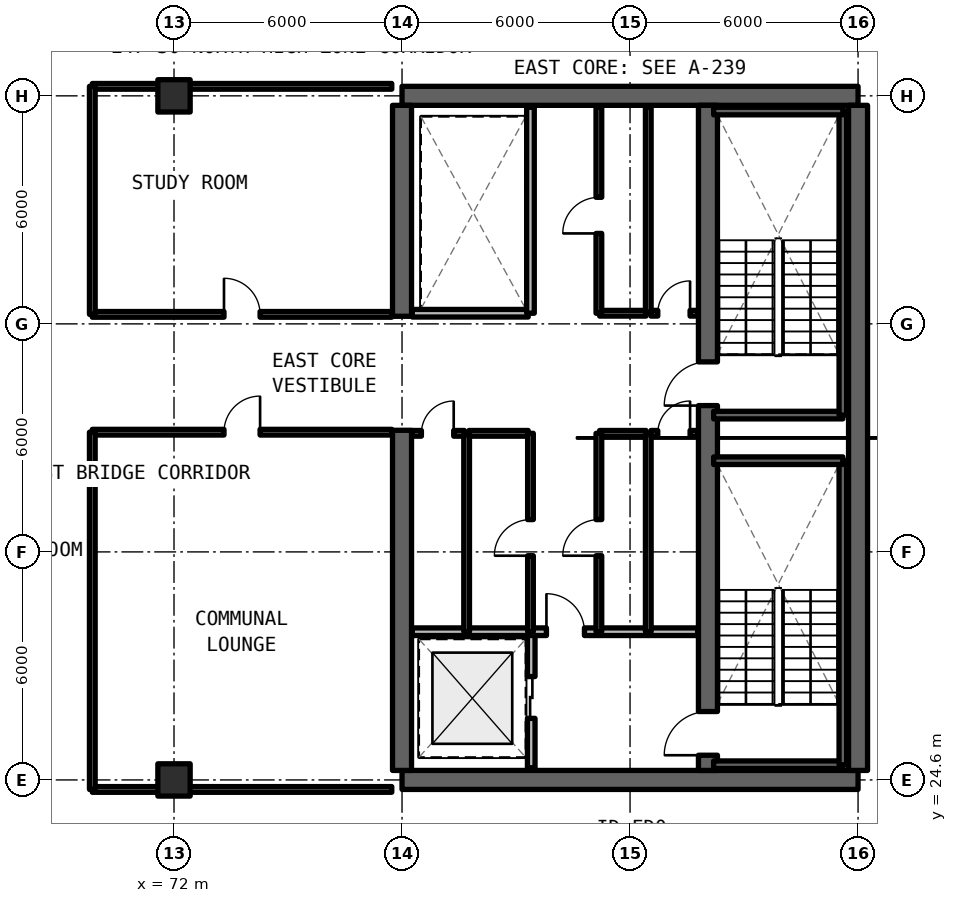
"""IFC4 building model, lengths in metres.
Left out: names, types, materials, properties, quantities, classifications, styles, units other than length and angle.
Written with IfcOpenShell. Run it as: python <this file> out.ifc"""

import sys

from ifc_helpers import new_model, si_unit, direction, frame, frame_2d, origin, origin_2d, place, context, subcontext, project, spatial, rectangle, extrude, element, fill, save


model = new_model("IFC4")
c1 = context("Model", 3, precision=1e-05, world=origin(), true_north=direction((0.0, 1.0)))
c2 = subcontext(c1, "Body", "Model", "MODEL_VIEW")
j1 = project(units=[si_unit("LENGTHUNIT", "METRE"), si_unit("PLANEANGLEUNIT", "RADIAN")], contexts=[c1])
p1 = place(None, origin())
s1 = spatial("IfcSite", under=j1, at=p1, CompositionType="ELEMENT")
p2 = place(p1, origin())
s2 = spatial("IfcBuilding", under=s1, at=p2, CompositionType="ELEMENT")
p3 = place(p2, frame((0.0, 0.0, 169.29)))
s3 = spatial("IfcBuildingStorey", under=s2, at=p3, CompositionType="ELEMENT", Elevation=169.29)
for number, where, z_axis, x_axis in (
    (1, (78.0, 24.6, 0.0), (0.0, 0.0, 1.0), (1.0, 0.0, 0.0)),
    (2, (90.0, 42.6, 0.0), (0.0, 0.0, 1.0), (-1.0, 0.0, 0.0)),
):
    element("IfcWall", number, at=place(p3, frame(where, z_axis=z_axis, x_axis=x_axis)), inside=s3, PredefinedType="SHEAR", context=c2, shape_type="SweptSolid", body=[
        extrude(rectangle(XDim=12.0, YDim=0.5, at=frame_2d((6.0, 0.0))), origin(), (0.0, 0.0, 1.0), 3.63),
    ])
p4 = place(p3, frame((90.0, 24.85, 0.0), z_axis=(0.0, 0.0, 1.0), x_axis=(0.0, 1.0, 0.0)))
e3 = element("IfcWall", 3, at=p4, inside=s3, PredefinedType="SHEAR", context=c2, shape_type="SweptSolid", body=[
    extrude(rectangle(XDim=17.5, YDim=0.5, at=frame_2d((8.75, 0.0))), origin(), (0.0, 0.0, 1.0), 3.63),
])
p5 = place(p3, frame((78.0, 24.85, 0.0), z_axis=(0.0, 0.0, 1.0), x_axis=(0.0, 1.0, 0.0)))
e4 = element("IfcWall", 4, at=p5, inside=s3, PredefinedType="SHEAR", context=c2, shape_type="SweptSolid", body=[
    extrude(rectangle(XDim=8.95, YDim=0.5, at=frame_2d((4.475, 0.0))), origin(), (0.0, 0.0, 1.0), 3.63),
])
p6 = place(p3, frame((78.0, 36.8, 0.0), z_axis=(0.0, 0.0, 1.0), x_axis=(0.0, 1.0, 0.0)))
e5 = element("IfcWall", 5, at=p6, inside=s3, PredefinedType="SHEAR", context=c2, shape_type="SweptSolid", body=[
    extrude(rectangle(XDim=5.55, YDim=0.5, at=frame_2d((2.775, 0.0))), origin(), (0.0, 0.0, 1.0), 3.63),
])
p7 = place(p3, frame((86.05, 24.85, 0.0), z_axis=(0.0, 0.0, 1.0), x_axis=(0.0, 1.0, 0.0)))
e6 = element("IfcWall", 6, at=p7, inside=s3, PredefinedType="SHEAR", context=c2, shape_type="SweptSolid", body=[
    extrude(rectangle(XDim=17.5, YDim=0.5, at=frame_2d((8.75, 0.0))), origin(), (0.0, 0.0, 1.0), 3.63),
])
p8 = place(p7, frame((0.4, 0.0, 0.0)))
e7 = element("IfcOpeningElement", 7, at=p8, cuts=e6, PredefinedType="OPENING", context=c2, shape_type="SweptSolid", body=[
    extrude(rectangle(XDim=1.15, YDim=2.15, at=frame_2d((0.575, 1.075))), frame((0.0, 0.26, 0.0), z_axis=(0.0, -1.0, 0.0), x_axis=(1.0, 0.0, 0.0)), (0.0, 0.0, 1.0), 0.52),
])
p9 = place(p7, frame((9.6, 0.0, 0.0)))
e8 = element("IfcOpeningElement", 8, at=p9, cuts=e6, PredefinedType="OPENING", context=c2, shape_type="SweptSolid", body=[
    extrude(rectangle(XDim=1.15, YDim=2.15, at=frame_2d((0.575, 1.075))), frame((0.0, 0.26, 0.0), z_axis=(0.0, -1.0, 0.0), x_axis=(1.0, 0.0, 0.0)), (0.0, 0.0, 1.0), 0.52),
])
for number, where, z_axis, x_axis in (
    (9, (72.0, 24.6, 0.0), (0.0, 0.0, 1.0), (1.0, 0.0, 0.0)),
    (10, (72.0, 42.6, 0.0), (0.0, 0.0, 1.0), (1.0, 0.0, 0.0)),
):
    element("IfcColumn", number, at=place(p3, frame(where, z_axis=z_axis, x_axis=x_axis)), inside=s3, PredefinedType="COLUMN", context=c2, shape_type="SweptSolid", body=[
        extrude(rectangle(XDim=0.85, YDim=0.85, at=origin_2d()), origin(), (0.0, 0.0, 1.0), 3.63),
    ])
p10 = place(p3, frame((81.4, 24.92, 0.0), z_axis=(0.0, 0.0, 1.0), x_axis=(0.0, 1.0, 0.0)))
e11 = element("IfcWall", 11, at=p10, inside=s3, PredefinedType="SOLIDWALL", context=c2, shape_type="SweptSolid", body=[
    extrude(rectangle(XDim=3.58, YDim=0.2, at=frame_2d((1.79, 0.0))), origin(), (0.0, 0.0, 1.0), 2.57),
])
p11 = place(p10, frame((1.3, 0.0, 0.0)))
e12 = element("IfcOpeningElement", 12, at=p11, cuts=e11, PredefinedType="OPENING", context=c2, shape_type="SweptSolid", body=[
    extrude(rectangle(XDim=1.1, YDim=2.2, at=frame_2d((0.55, 1.1))), frame((0.0, 0.11, 0.0), z_axis=(0.0, -1.0, 0.0), x_axis=(1.0, 0.0, 0.0)), (0.0, 0.0, 1.0), 0.22),
])
p12 = place(p3, frame((78.27, 28.5, 0.0), z_axis=(0.0, 0.0, 1.0), x_axis=(1.0, 0.0, 0.0)))
e13 = element("IfcWall", 13, at=p12, inside=s3, PredefinedType="SOLIDWALL", context=c2, shape_type="SweptSolid", body=[
    extrude(rectangle(XDim=7.51, YDim=0.2, at=frame_2d((3.755, 0.0))), origin(), (0.0, 0.0, 1.0), 2.57),
])
p13 = place(p12, frame((3.53, 0.0, 0.0)))
e14 = element("IfcOpeningElement", 14, at=p13, cuts=e13, PredefinedType="OPENING", context=c2, shape_type="SweptSolid", body=[
    extrude(rectangle(XDim=1.0, YDim=2.15, at=frame_2d((0.5, 1.075))), frame((0.0, 0.11, 0.0), z_axis=(0.0, -1.0, 0.0), x_axis=(1.0, 0.0, 0.0)), (0.0, 0.0, 1.0), 0.22),
])
p14 = place(p3, frame((84.48, 28.5, 0.0), z_axis=(0.0, 0.0, 1.0), x_axis=(0.0, 1.0, 0.0)))
e15 = element("IfcWall", 15, at=p14, inside=s3, PredefinedType="SOLIDWALL", context=c2, shape_type="SweptSolid", body=[
    extrude(rectangle(XDim=5.22, YDim=0.15, at=frame_2d((2.61, 0.0))), origin(), (0.0, 0.0, 1.0), 2.57),
])
p15 = place(p3, frame((84.55, 33.72, 0.0), z_axis=(0.0, 0.0, 1.0), x_axis=(1.0, 0.0, 0.0)))
e16 = element("IfcWall", 16, at=p15, inside=s3, PredefinedType="SOLIDWALL", context=c2, shape_type="SweptSolid", body=[
    extrude(rectangle(XDim=1.23, YDim=0.15, at=frame_2d((0.615, 0.0))), origin(), (0.0, 0.0, 1.0), 2.57),
])
p16 = place(p15, frame((0.18, 0.0, 0.0)))
e17 = element("IfcOpeningElement", 17, at=p16, cuts=e16, PredefinedType="OPENING", context=c2, shape_type="SweptSolid", body=[
    extrude(rectangle(XDim=0.85, YDim=2.1, at=frame_2d((0.425, 1.05))), frame((0.0, 0.085, 0.0), z_axis=(0.0, -1.0, 0.0), x_axis=(1.0, 0.0, 0.0)), (0.0, 0.0, 1.0), 0.17),
])
p17 = place(p3, frame((83.2, 33.72, 0.0), z_axis=(0.0, 0.0, 1.0), x_axis=(1.0, 0.0, 0.0)))
e18 = element("IfcWall", 18, at=p17, inside=s3, PredefinedType="SOLIDWALL", context=c2, shape_type="SweptSolid", body=[
    extrude(rectangle(XDim=1.22, YDim=0.15, at=frame_2d((0.61, 0.0))), origin(), (0.0, 0.0, 1.0), 2.57),
])
p18 = place(p3, frame((83.18, 28.5, 0.0), z_axis=(0.0, 0.0, 1.0), x_axis=(0.0, 1.0, 0.0)))
e19 = element("IfcWall", 19, at=p18, inside=s3, PredefinedType="SOLIDWALL", context=c2, shape_type="SweptSolid", body=[
    extrude(rectangle(XDim=5.22, YDim=0.15, at=frame_2d((2.61, 0.0))), origin(), (0.0, 0.0, 1.0), 2.57),
])
p19 = place(p18, frame((2.0, 0.0, 0.0)))
e20 = element("IfcOpeningElement", 20, at=p19, cuts=e19, PredefinedType="OPENING", context=c2, shape_type="SweptSolid", body=[
    extrude(rectangle(XDim=0.95, YDim=2.15, at=frame_2d((0.475, 1.075))), frame((0.0, 0.085, 0.0), z_axis=(0.0, -1.0, 0.0), x_axis=(1.0, 0.0, 0.0)), (0.0, 0.0, 1.0), 0.17),
])
p20 = place(p3, frame((79.7, 28.5, 0.0), z_axis=(0.0, 0.0, 1.0), x_axis=(0.0, 1.0, 0.0)))
e21 = element("IfcWall", 21, at=p20, inside=s3, PredefinedType="SOLIDWALL", context=c2, shape_type="SweptSolid", body=[
    extrude(rectangle(XDim=5.22, YDim=0.15, at=frame_2d((2.61, 0.0))), origin(), (0.0, 0.0, 1.0), 2.57),
])
p21 = place(p3, frame((79.76, 33.72, 0.0), z_axis=(0.0, 0.0, 1.0), x_axis=(1.0, 0.0, 0.0)))
e22 = element("IfcWall", 22, at=p21, inside=s3, PredefinedType="SOLIDWALL", context=c2, shape_type="SweptSolid", body=[
    extrude(rectangle(XDim=1.56, YDim=0.15, at=frame_2d((0.78, 0.0))), origin(), (0.0, 0.0, 1.0), 2.57),
])
p22 = place(p3, frame((78.27, 33.72, 0.0), z_axis=(0.0, 0.0, 1.0), x_axis=(1.0, 0.0, 0.0)))
e23 = element("IfcWall", 23, at=p22, inside=s3, PredefinedType="SOLIDWALL", context=c2, shape_type="SweptSolid", body=[
    extrude(rectangle(XDim=1.37, YDim=0.15, at=frame_2d((0.685, 0.0))), origin(), (0.0, 0.0, 1.0), 2.57),
])
p23 = place(p22, frame((0.24, 0.0, 0.0)))
e24 = element("IfcOpeningElement", 24, at=p23, cuts=e23, PredefinedType="OPENING", context=c2, shape_type="SweptSolid", body=[
    extrude(rectangle(XDim=0.85, YDim=2.1, at=frame_2d((0.425, 1.05))), frame((0.0, 0.085, 0.0), z_axis=(0.0, -1.0, 0.0), x_axis=(1.0, 0.0, 0.0)), (0.0, 0.0, 1.0), 0.17),
])
p24 = place(p3, frame((81.38, 28.5, 0.0), z_axis=(0.0, 0.0, 1.0), x_axis=(0.0, 1.0, 0.0)))
e25 = element("IfcWall", 25, at=p24, inside=s3, PredefinedType="SOLIDWALL", context=c2, shape_type="SweptSolid", body=[
    extrude(rectangle(XDim=5.22, YDim=0.15, at=frame_2d((2.61, 0.0))), origin(), (0.0, 0.0, 1.0), 2.57),
])
p25 = place(p24, frame((2.0, 0.0, 0.0)))
e26 = element("IfcOpeningElement", 26, at=p25, cuts=e25, PredefinedType="OPENING", context=c2, shape_type="SweptSolid", body=[
    extrude(rectangle(XDim=0.95, YDim=2.15, at=frame_2d((0.475, 1.075))), frame((0.0, 0.085, 0.0), z_axis=(0.0, -1.0, 0.0), x_axis=(1.0, 0.0, 0.0)), (0.0, 0.0, 1.0), 0.17),
])
p26 = place(p3, frame((84.48, 36.88, 0.0), z_axis=(0.0, 0.0, 1.0), x_axis=(0.0, 1.0, 0.0)))
e27 = element("IfcWall", 27, at=p26, inside=s3, PredefinedType="SOLIDWALL", context=c2, shape_type="SweptSolid", body=[
    extrude(rectangle(XDim=5.42, YDim=0.15, at=frame_2d((2.71, 0.0))), origin(), (0.0, 0.0, 1.0), 2.57),
])
p27 = place(p3, frame((84.55, 36.88, 0.0), z_axis=(0.0, 0.0, 1.0), x_axis=(1.0, 0.0, 0.0)))
e28 = element("IfcWall", 28, at=p27, inside=s3, PredefinedType="SOLIDWALL", context=c2, shape_type="SweptSolid", body=[
    extrude(rectangle(XDim=1.23, YDim=0.15, at=frame_2d((0.615, 0.0))), origin(), (0.0, 0.0, 1.0), 2.57),
])
p28 = place(p27, frame((0.18, 0.0, 0.0)))
e29 = element("IfcOpeningElement", 29, at=p28, cuts=e28, PredefinedType="OPENING", context=c2, shape_type="SweptSolid", body=[
    extrude(rectangle(XDim=0.85, YDim=2.1, at=frame_2d((0.425, 1.05))), frame((0.0, 0.085, 0.0), z_axis=(0.0, -1.0, 0.0), x_axis=(1.0, 0.0, 0.0)), (0.0, 0.0, 1.0), 0.17),
])
p29 = place(p3, frame((83.2, 36.88, 0.0), z_axis=(0.0, 0.0, 1.0), x_axis=(1.0, 0.0, 0.0)))
e30 = element("IfcWall", 30, at=p29, inside=s3, PredefinedType="SOLIDWALL", context=c2, shape_type="SweptSolid", body=[
    extrude(rectangle(XDim=1.22, YDim=0.15, at=frame_2d((0.61, 0.0))), origin(), (0.0, 0.0, 1.0), 2.57),
])
p30 = place(p3, frame((83.18, 36.88, 0.0), z_axis=(0.0, 0.0, 1.0), x_axis=(0.0, 1.0, 0.0)))
e31 = element("IfcWall", 31, at=p30, inside=s3, PredefinedType="SOLIDWALL", context=c2, shape_type="SweptSolid", body=[
    extrude(rectangle(XDim=5.42, YDim=0.15, at=frame_2d((2.71, 0.0))), origin(), (0.0, 0.0, 1.0), 2.57),
])
p31 = place(p30, frame((2.1, 0.0, 0.0)))
e32 = element("IfcOpeningElement", 32, at=p31, cuts=e31, PredefinedType="OPENING", context=c2, shape_type="SweptSolid", body=[
    extrude(rectangle(XDim=0.95, YDim=2.15, at=frame_2d((0.475, 1.075))), frame((0.0, 0.085, 0.0), z_axis=(0.0, -1.0, 0.0), x_axis=(1.0, 0.0, 0.0)), (0.0, 0.0, 1.0), 0.17),
])
p32 = place(p3, frame((78.27, 36.88, 0.0), z_axis=(0.0, 0.0, 1.0), x_axis=(1.0, 0.0, 0.0)))
e33 = element("IfcWall", 33, at=p32, inside=s3, PredefinedType="SOLIDWALL", context=c2, shape_type="SweptSolid", body=[
    extrude(rectangle(XDim=3.05, YDim=0.2, at=frame_2d((1.525, 0.0))), origin(), (0.0, 0.0, 1.0), 2.57),
])
p33 = place(p3, frame((81.38, 36.88, 0.0), z_axis=(0.0, 0.0, 1.0), x_axis=(0.0, 1.0, 0.0)))
e34 = element("IfcWall", 34, at=p33, inside=s3, PredefinedType="SOLIDWALL", context=c2, shape_type="SweptSolid", body=[
    extrude(rectangle(XDim=5.42, YDim=0.2, at=frame_2d((2.71, 0.0))), origin(), (0.0, 0.0, 1.0), 2.57),
])
p34 = place(p3, frame((69.85, 24.35, 0.0), z_axis=(0.0, 0.0, 1.0), x_axis=(1.0, 0.0, 0.0)))
e35 = element("IfcWall", 35, at=p34, inside=s3, PredefinedType="SOLIDWALL", context=c2, shape_type="SweptSolid", body=[
    extrude(rectangle(XDim=7.88, YDim=0.15, at=frame_2d((3.94, 0.0))), origin(), (0.0, 0.0, 1.0), 2.57),
])
p35 = place(p3, frame((69.85, 33.75, 0.0), z_axis=(0.0, 0.0, 1.0), x_axis=(1.0, 0.0, 0.0)))
e36 = element("IfcWall", 36, at=p35, inside=s3, PredefinedType="SOLIDWALL", context=c2, shape_type="SweptSolid", body=[
    extrude(rectangle(XDim=7.88, YDim=0.15, at=frame_2d((3.94, 0.0))), origin(), (0.0, 0.0, 1.0), 2.57),
])
p36 = place(p35, frame((3.465, 0.0, 0.0)))
e37 = element("IfcOpeningElement", 37, at=p36, cuts=e36, PredefinedType="OPENING", context=c2, shape_type="SweptSolid", body=[
    extrude(rectangle(XDim=0.95, YDim=2.15, at=frame_2d((0.475, 1.075))), frame((0.0, 0.085, 0.0), z_axis=(0.0, -1.0, 0.0), x_axis=(1.0, 0.0, 0.0)), (0.0, 0.0, 1.0), 0.17),
])
p37 = place(p3, frame((69.85, 24.35, 0.0), z_axis=(0.0, 0.0, 1.0), x_axis=(0.0, 1.0, 0.0)))
e38 = element("IfcWall", 38, at=p37, inside=s3, PredefinedType="SOLIDWALL", context=c2, shape_type="SweptSolid", body=[
    extrude(rectangle(XDim=9.4, YDim=0.15, at=frame_2d((4.7, 0.0))), origin(), (0.0, 0.0, 1.0), 2.57),
])
p38 = place(p3, frame((69.85, 36.85, 0.0), z_axis=(0.0, 0.0, 1.0), x_axis=(1.0, 0.0, 0.0)))
e39 = element("IfcWall", 39, at=p38, inside=s3, PredefinedType="SOLIDWALL", context=c2, shape_type="SweptSolid", body=[
    extrude(rectangle(XDim=7.88, YDim=0.15, at=frame_2d((3.94, 0.0))), origin(), (0.0, 0.0, 1.0), 2.57),
])
p39 = place(p38, frame((3.465, 0.0, 0.0)))
e40 = element("IfcOpeningElement", 40, at=p39, cuts=e39, PredefinedType="OPENING", context=c2, shape_type="SweptSolid", body=[
    extrude(rectangle(XDim=0.95, YDim=2.15, at=frame_2d((0.475, 1.075))), frame((0.0, 0.085, 0.0), z_axis=(0.0, -1.0, 0.0), x_axis=(1.0, 0.0, 0.0)), (0.0, 0.0, 1.0), 0.17),
])
p40 = place(p3, frame((69.85, 42.85, 0.0), z_axis=(0.0, 0.0, 1.0), x_axis=(1.0, 0.0, 0.0)))
e41 = element("IfcWall", 41, at=p40, inside=s3, PredefinedType="SOLIDWALL", context=c2, shape_type="SweptSolid", body=[
    extrude(rectangle(XDim=7.88, YDim=0.15, at=frame_2d((3.94, 0.0))), origin(), (0.0, 0.0, 1.0), 2.57),
])
p41 = place(p3, frame((69.85, 36.85, 0.0), z_axis=(0.0, 0.0, 1.0), x_axis=(0.0, 1.0, 0.0)))
e42 = element("IfcWall", 42, at=p41, inside=s3, PredefinedType="SOLIDWALL", context=c2, shape_type="SweptSolid", body=[
    extrude(rectangle(XDim=6.0, YDim=0.15, at=frame_2d((3.0, 0.0))), origin(), (0.0, 0.0, 1.0), 2.57),
])
p42 = place(p3, frame((86.2, 25.0, 0.0), z_axis=(0.0, 0.0, 1.0), x_axis=(1.0, 0.0, 0.0)))
e43 = element("IfcWall", 43, at=p42, inside=s3, PredefinedType="SOLIDWALL", context=c2, shape_type="SweptSolid", body=[
    extrude(rectangle(XDim=3.4, YDim=0.2, at=frame_2d((1.7, 0.0))), origin(), (0.0, 0.0, 1.0), 3.63),
])
p43 = place(p3, frame((89.6, 25.0, 0.0), z_axis=(0.0, 0.0, 1.0), x_axis=(0.0, 1.0, 0.0)))
e44 = element("IfcWall", 44, at=p43, inside=s3, PredefinedType="SOLIDWALL", context=c2, shape_type="SweptSolid", body=[
    extrude(rectangle(XDim=8.0, YDim=0.2, at=frame_2d((4.0, 0.0))), origin(), (0.0, 0.0, 1.0), 3.63),
])
for number, where, z_axis, x_axis in (
    (45, (89.6, 33.0, 0.0), (0.0, 0.0, 1.0), (-1.0, 0.0, 0.0)),
    (46, (86.2, 34.2, 0.0), (0.0, 0.0, 1.0), (1.0, 0.0, 0.0)),
):
    element("IfcWall", number, at=place(p3, frame(where, z_axis=z_axis, x_axis=x_axis)), inside=s3, PredefinedType="SOLIDWALL", context=c2, shape_type="SweptSolid", body=[
        extrude(rectangle(XDim=3.4, YDim=0.2, at=frame_2d((1.7, 0.0))), origin(), (0.0, 0.0, 1.0), 3.63),
    ])
p44 = place(p3, frame((89.6, 34.2, 0.0), z_axis=(0.0, 0.0, 1.0), x_axis=(0.0, 1.0, 0.0)))
e47 = element("IfcWall", 47, at=p44, inside=s3, PredefinedType="SOLIDWALL", context=c2, shape_type="SweptSolid", body=[
    extrude(rectangle(XDim=8.0, YDim=0.2, at=frame_2d((4.0, 0.0))), origin(), (0.0, 0.0, 1.0), 3.63),
])
p45 = place(p3, frame((89.6, 42.2, 0.0), z_axis=(0.0, 0.0, 1.0), x_axis=(-1.0, 0.0, 0.0)))
e48 = element("IfcWall", 48, at=p45, inside=s3, PredefinedType="SOLIDWALL", context=c2, shape_type="SweptSolid", body=[
    extrude(rectangle(XDim=3.4, YDim=0.2, at=frame_2d((1.7, 0.0))), origin(), (0.0, 0.0, 1.0), 3.63),
])
p46 = place(p11, origin())
e49 = element("IfcDoor", 49, at=p46, inside=s3, OperationType="SLIDING_TO_LEFT", PredefinedType="DOOR", context=c2, shape_type="SweptSolid", body=[
    extrude(rectangle(XDim=1.1, YDim=2.2, at=frame_2d((0.55, 1.1))), frame((0.0, 0.025, 0.0), z_axis=(0.0, -1.0, 0.0), x_axis=(1.0, 0.0, 0.0)), (0.0, 0.0, 1.0), 0.05),
])
fill(e12, e49)
p47 = place(p13, origin())
e50 = element("IfcDoor", 50, at=p47, inside=s3, OperationType="SINGLE_SWING_LEFT", PredefinedType="DOOR", context=c2, shape_type="SweptSolid", body=[
    extrude(rectangle(XDim=1.0, YDim=2.15, at=frame_2d((0.5, 1.075))), frame((0.0, 0.025, 0.0), z_axis=(0.0, -1.0, 0.0), x_axis=(1.0, 0.0, 0.0)), (0.0, 0.0, 1.0), 0.05),
])
fill(e14, e50)
p48 = place(p16, origin())
e51 = element("IfcDoor", 51, at=p48, inside=s3, OperationType="SINGLE_SWING_RIGHT", PredefinedType="DOOR", context=c2, shape_type="SweptSolid", body=[
    extrude(rectangle(XDim=0.85, YDim=2.1, at=frame_2d((0.425, 1.05))), frame((0.0, 0.025, 0.0), z_axis=(0.0, -1.0, 0.0), x_axis=(1.0, 0.0, 0.0)), (0.0, 0.0, 1.0), 0.05),
])
fill(e17, e51)
p49 = place(p19, origin())
e52 = element("IfcDoor", 52, at=p49, inside=s3, OperationType="SINGLE_SWING_LEFT", PredefinedType="DOOR", context=c2, shape_type="SweptSolid", body=[
    extrude(rectangle(XDim=0.95, YDim=2.15, at=frame_2d((0.475, 1.075))), frame((0.0, 0.025, 0.0), z_axis=(0.0, -1.0, 0.0), x_axis=(1.0, 0.0, 0.0)), (0.0, 0.0, 1.0), 0.05),
])
fill(e20, e52)
p50 = place(p23, origin())
e53 = element("IfcDoor", 53, at=p50, inside=s3, OperationType="SINGLE_SWING_RIGHT", PredefinedType="DOOR", context=c2, shape_type="SweptSolid", body=[
    extrude(rectangle(XDim=0.85, YDim=2.1, at=frame_2d((0.425, 1.05))), frame((0.0, 0.025, 0.0), z_axis=(0.0, -1.0, 0.0), x_axis=(1.0, 0.0, 0.0)), (0.0, 0.0, 1.0), 0.05),
])
fill(e24, e53)
p51 = place(p25, origin())
e54 = element("IfcDoor", 54, at=p51, inside=s3, OperationType="SINGLE_SWING_LEFT", PredefinedType="DOOR", context=c2, shape_type="SweptSolid", body=[
    extrude(rectangle(XDim=0.95, YDim=2.15, at=frame_2d((0.475, 1.075))), frame((0.0, 0.025, 0.0), z_axis=(0.0, -1.0, 0.0), x_axis=(1.0, 0.0, 0.0)), (0.0, 0.0, 1.0), 0.05),
])
fill(e26, e54)
p52 = place(p28, origin())
e55 = element("IfcDoor", 55, at=p52, inside=s3, OperationType="SINGLE_SWING_RIGHT", PredefinedType="DOOR", context=c2, shape_type="SweptSolid", body=[
    extrude(rectangle(XDim=0.85, YDim=2.1, at=frame_2d((0.425, 1.05))), frame((0.0, 0.025, 0.0), z_axis=(0.0, -1.0, 0.0), x_axis=(1.0, 0.0, 0.0)), (0.0, 0.0, 1.0), 0.05),
])
fill(e29, e55)
p53 = place(p31, origin())
e56 = element("IfcDoor", 56, at=p53, inside=s3, OperationType="SINGLE_SWING_LEFT", PredefinedType="DOOR", context=c2, shape_type="SweptSolid", body=[
    extrude(rectangle(XDim=0.95, YDim=2.15, at=frame_2d((0.475, 1.075))), frame((0.0, 0.025, 0.0), z_axis=(0.0, -1.0, 0.0), x_axis=(1.0, 0.0, 0.0)), (0.0, 0.0, 1.0), 0.05),
])
fill(e32, e56)
p54 = place(p36, origin())
e57 = element("IfcDoor", 57, at=p54, inside=s3, OperationType="SINGLE_SWING_RIGHT", PredefinedType="DOOR", context=c2, shape_type="SweptSolid", body=[
    extrude(rectangle(XDim=0.95, YDim=2.15, at=frame_2d((0.475, 1.075))), frame((0.0, 0.025, 0.0), z_axis=(0.0, -1.0, 0.0), x_axis=(1.0, 0.0, 0.0)), (0.0, 0.0, 1.0), 0.05),
])
fill(e37, e57)
p55 = place(p39, origin())
e58 = element("IfcDoor", 58, at=p55, inside=s3, OperationType="SINGLE_SWING_LEFT", PredefinedType="DOOR", context=c2, shape_type="SweptSolid", body=[
    extrude(rectangle(XDim=0.95, YDim=2.15, at=frame_2d((0.475, 1.075))), frame((0.0, 0.025, 0.0), z_axis=(0.0, -1.0, 0.0), x_axis=(1.0, 0.0, 0.0)), (0.0, 0.0, 1.0), 0.05),
])
fill(e40, e58)
p56 = place(p8, origin())
e59 = element("IfcDoor", 59, at=p56, inside=s3, OperationType="SINGLE_SWING_RIGHT", PredefinedType="DOOR", context=c2, shape_type="SweptSolid", body=[
    extrude(rectangle(XDim=1.15, YDim=2.15, at=frame_2d((0.575, 1.075))), frame((0.0, 0.025, 0.0), z_axis=(0.0, -1.0, 0.0), x_axis=(1.0, 0.0, 0.0)), (0.0, 0.0, 1.0), 0.05),
])
fill(e7, e59)
p57 = place(p9, origin())
e60 = element("IfcDoor", 60, at=p57, inside=s3, OperationType="SINGLE_SWING_LEFT", PredefinedType="DOOR", context=c2, shape_type="SweptSolid", body=[
    extrude(rectangle(XDim=1.15, YDim=2.15, at=frame_2d((0.575, 1.075))), frame((0.0, 0.025, 0.0), z_axis=(0.0, -1.0, 0.0), x_axis=(1.0, 0.0, 0.0)), (0.0, 0.0, 1.0), 0.05),
])
fill(e8, e60)
save(model, sys.argv[1])
